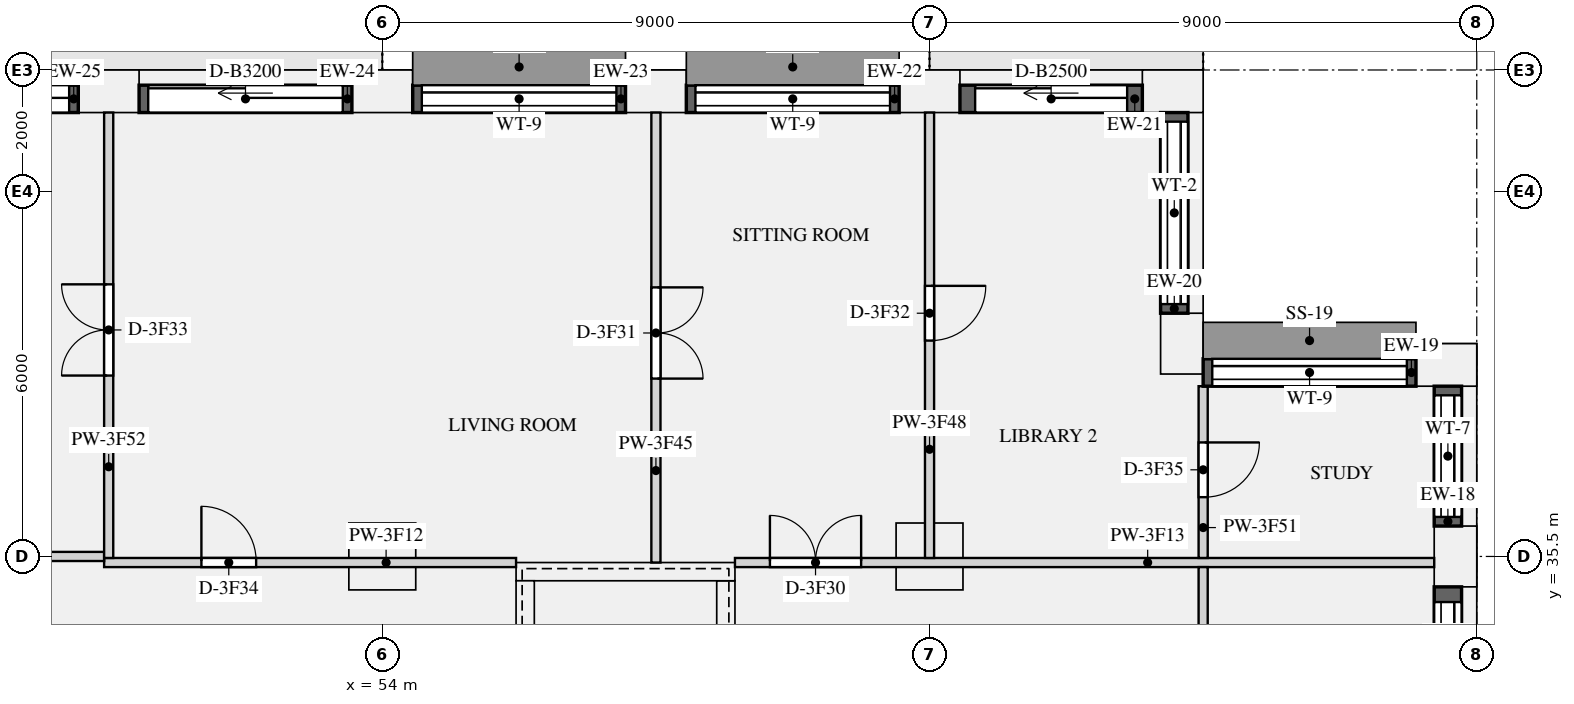
"""IFC4 building model, lengths in metres.
Left out: names, types, materials, properties, quantities, classifications, styles, units other than length and angle.
Written with IfcOpenShell. Run it as: python <this file> out.ifc"""

import sys

from ifc_helpers import new_model, si_unit, direction, frame, frame_2d, origin, origin_2d, place, context, subcontext, project, spatial, rectangle, extrude, element, fill, save


model = new_model("IFC4")
c1 = context("Model", 3, precision=1e-05, world=origin(), true_north=direction((0.0, 1.0)))
c2 = subcontext(c1, "Body", "Model", "MODEL_VIEW")
j1 = project(units=[si_unit("LENGTHUNIT", "METRE"), si_unit("PLANEANGLEUNIT", "RADIAN")], contexts=[c1])
p1 = place(None, origin())
s1 = spatial("IfcSite", under=j1, at=p1, CompositionType="ELEMENT")
p2 = place(p1, origin())
s2 = spatial("IfcBuilding", under=s1, at=p2, CompositionType="ELEMENT")
p3 = place(p2, frame((0.0, 0.0, 182.25)))
s3 = spatial("IfcBuildingStorey", under=s2, at=p3, CompositionType="ELEMENT", Elevation=182.25)
p4 = place(p3, frame((71.65, 35.5, 0.0), z_axis=(0.0, 0.0, 1.0), x_axis=(0.0, 1.0, 0.0)))
e1 = element("IfcColumn", 1, at=p4, inside=s3, PredefinedType="USERDEFINED", context=c2, shape_type="SweptSolid", body=[
    extrude(rectangle(XDim=1.0, YDim=0.7, at=origin_2d()), origin(), (0.0, 0.0, 1.0), 2.65),
])
p5 = place(p3, frame((71.5, 38.65, 0.0), z_axis=(0.0, 0.0, 1.0), x_axis=(-1.0, 0.0, 0.0)))
e2 = element("IfcColumn", 2, at=p5, inside=s3, PredefinedType="USERDEFINED", context=c2, shape_type="SweptSolid", body=[
    extrude(rectangle(XDim=1.0, YDim=0.7, at=origin_2d()), origin(), (0.0, 0.0, 1.0), 3.15),
])
for number, where, z_axis, x_axis in (
    (3, (67.15, 39.0, 0.0), (0.0, 0.0, 1.0), (0.0, 1.0, 0.0)),
    (4, (67.0, 43.15, 0.0), (0.0, 0.0, 1.0), (-1.0, 0.0, 0.0)),
    (5, (63.0, 43.15, 0.0), (0.0, 0.0, 1.0), (-1.0, 0.0, 0.0)),
    (6, (58.5, 43.15, 0.0), (0.0, 0.0, 1.0), (-1.0, 0.0, 0.0)),
    (7, (54.0, 43.15, 0.0), (0.0, 0.0, 1.0), (-1.0, 0.0, 0.0)),
    (8, (49.5, 43.15, 0.0), (0.0, 0.0, 1.0), (-1.0, 0.0, 0.0)),
):
    element("IfcColumn", number, at=place(p3, frame(where, z_axis=z_axis, x_axis=x_axis)), inside=s3, PredefinedType="USERDEFINED", context=c2, shape_type="SweptSolid", body=[
        extrude(rectangle(XDim=1.0, YDim=0.7, at=origin_2d()), origin(), (0.0, 0.0, 1.0), 2.65),
    ])
for number, where, z_axis, x_axis in (
    (9, (54.0, 35.5, 0.0), (0.0, 0.0, 1.0), (1.0, 0.0, 0.0)),
    (10, (63.0, 35.5, 0.0), (0.0, 0.0, 1.0), (1.0, 0.0, 0.0)),
):
    element("IfcColumn", number, at=place(p3, frame(where, z_axis=z_axis, x_axis=x_axis)), inside=s3, PredefinedType="COLUMN", context=c2, shape_type="SweptSolid", body=[
        extrude(rectangle(XDim=1.1, YDim=1.1, at=origin_2d()), origin(), (0.0, 0.0, 1.0), 3.15),
    ])
p6 = place(p3, frame((56.2, 35.25, 0.0), z_axis=(0.0, 0.0, 1.0), x_axis=(1.0, 0.0, 0.0)))
e11 = element("IfcWall", 11, at=p6, inside=s3, PredefinedType="SHEAR", context=c2, shape_type="SweptSolid", body=[
    extrude(rectangle(XDim=3.6, YDim=0.3, at=frame_2d((1.8, 0.0))), origin(), (0.0, 0.0, 1.0), 3.15),
])
for number, where, z_axis, x_axis in (
    (12, (56.35, 27.3, 0.0), (0.0, 0.0, 1.0), (0.0, 1.0, 0.0)),
    (13, (59.65, 27.3, 0.0), (0.0, 0.0, 1.0), (0.0, 1.0, 0.0)),
):
    element("IfcWall", number, at=place(p3, frame(where, z_axis=z_axis, x_axis=x_axis)), inside=s3, PredefinedType="SHEAR", context=c2, shape_type="SweptSolid", body=[
        extrude(rectangle(XDim=7.8, YDim=0.3, at=frame_2d((3.9, 0.0))), origin(), (0.0, 0.0, 1.0), 3.15),
    ])
p7 = place(p3, frame((71.525, 32.5, 0.9), z_axis=(0.0, 0.0, 1.0), x_axis=(0.0, 1.0, 0.0)))
e14 = element("IfcWall", 14, at=p7, inside=s3, PredefinedType="SOLIDWALL", context=c2, shape_type="SweptSolid", body=[
    extrude(rectangle(XDim=2.5, YDim=0.45, at=frame_2d((1.25, 0.0))), origin(), (0.0, 0.0, 1.0), 1.75),
])
p8 = place(p7, frame((0.25, 0.0, 0.15)))
e15 = element("IfcOpeningElement", 15, at=p8, cuts=e14, PredefinedType="OPENING", context=c2, shape_type="SweptSolid", body=[
    extrude(rectangle(XDim=2.0, YDim=1.5, at=frame_2d((1.0, 0.75))), frame((0.0, 0.235, 0.0), z_axis=(0.0, -1.0, 0.0), x_axis=(1.0, 0.0, 0.0)), (0.0, 0.0, 1.0), 0.47),
])
p9 = place(p3, frame((71.525, 36.0, 0.9), z_axis=(0.0, 0.0, 1.0), x_axis=(0.0, 1.0, 0.0)))
e16 = element("IfcWall", 16, at=p9, inside=s3, PredefinedType="SOLIDWALL", context=c2, shape_type="SweptSolid", body=[
    extrude(rectangle(XDim=2.3, YDim=0.45, at=frame_2d((1.15, 0.0))), origin(), (0.0, 0.0, 1.0), 1.75),
])
p10 = place(p9, frame((0.15, 0.0, 0.15)))
e17 = element("IfcOpeningElement", 17, at=p10, cuts=e16, PredefinedType="OPENING", context=c2, shape_type="SweptSolid", body=[
    extrude(rectangle(XDim=2.0, YDim=1.5, at=frame_2d((1.0, 0.75))), frame((0.0, 0.235, 0.0), z_axis=(0.0, -1.0, 0.0), x_axis=(1.0, 0.0, 0.0)), (0.0, 0.0, 1.0), 0.47),
])
p11 = place(p3, frame((71.0, 38.525, 0.9), z_axis=(0.0, 0.0, 1.0), x_axis=(-1.0, 0.0, 0.0)))
e18 = element("IfcWall", 18, at=p11, inside=s3, PredefinedType="SOLIDWALL", context=c2, shape_type="SweptSolid", body=[
    extrude(rectangle(XDim=3.5, YDim=0.45, at=frame_2d((1.75, 0.0))), origin(), (0.0, 0.0, 1.0), 1.75),
])
p12 = place(p11, frame((0.15, 0.0, 0.15)))
e19 = element("IfcOpeningElement", 19, at=p12, cuts=e18, PredefinedType="OPENING", context=c2, shape_type="SweptSolid", body=[
    extrude(rectangle(XDim=3.2, YDim=1.5, at=frame_2d((1.6, 0.75))), frame((0.0, 0.235, 0.0), z_axis=(0.0, -1.0, 0.0), x_axis=(1.0, 0.0, 0.0)), (0.0, 0.0, 1.0), 0.47),
])
p13 = place(p3, frame((67.025, 39.5, 0.9), z_axis=(0.0, 0.0, 1.0), x_axis=(0.0, 1.0, 0.0)))
e20 = element("IfcWall", 20, at=p13, inside=s3, PredefinedType="SOLIDWALL", context=c2, shape_type="SweptSolid", body=[
    extrude(rectangle(XDim=3.3, YDim=0.45, at=frame_2d((1.65, 0.0))), origin(), (0.0, 0.0, 1.0), 1.75),
])
p14 = place(p13, frame((0.15, 0.0, 0.15)))
e21 = element("IfcOpeningElement", 21, at=p14, cuts=e20, PredefinedType="OPENING", context=c2, shape_type="SweptSolid", body=[
    extrude(rectangle(XDim=3.0, YDim=1.5, at=frame_2d((1.5, 0.75))), frame((0.0, 0.235, 0.0), z_axis=(0.0, -1.0, 0.0), x_axis=(1.0, 0.0, 0.0)), (0.0, 0.0, 1.0), 0.47),
])
p15 = place(p3, frame((66.5, 43.025, 0.0), z_axis=(0.0, 0.0, 1.0), x_axis=(-1.0, 0.0, 0.0)))
e22 = element("IfcWall", 22, at=p15, inside=s3, PredefinedType="SOLIDWALL", context=c2, shape_type="SweptSolid", body=[
    extrude(rectangle(XDim=3.0, YDim=0.45, at=frame_2d((1.5, 0.0))), origin(), (0.0, 0.0, 1.0), 2.65),
])
p16 = place(p15, frame((0.25, 0.0, 0.0)))
e23 = element("IfcOpeningElement", 23, at=p16, cuts=e22, PredefinedType="OPENING", context=c2, shape_type="SweptSolid", body=[
    extrude(rectangle(XDim=2.5, YDim=2.3, at=frame_2d((1.25, 1.15))), frame((0.0, 0.235, 0.0), z_axis=(0.0, -1.0, 0.0), x_axis=(1.0, 0.0, 0.0)), (0.0, 0.0, 1.0), 0.47),
])
p17 = place(p3, frame((62.5, 43.025, 0.9), z_axis=(0.0, 0.0, 1.0), x_axis=(-1.0, 0.0, 0.0)))
e24 = element("IfcWall", 24, at=p17, inside=s3, PredefinedType="SOLIDWALL", context=c2, shape_type="SweptSolid", body=[
    extrude(rectangle(XDim=3.5, YDim=0.45, at=frame_2d((1.75, 0.0))), origin(), (0.0, 0.0, 1.0), 1.75),
])
p18 = place(p17, frame((0.15, 0.0, 0.15)))
e25 = element("IfcOpeningElement", 25, at=p18, cuts=e24, PredefinedType="OPENING", context=c2, shape_type="SweptSolid", body=[
    extrude(rectangle(XDim=3.2, YDim=1.5, at=frame_2d((1.6, 0.75))), frame((0.0, 0.235, 0.0), z_axis=(0.0, -1.0, 0.0), x_axis=(1.0, 0.0, 0.0)), (0.0, 0.0, 1.0), 0.47),
])
p19 = place(p3, frame((58.0, 43.025, 0.9), z_axis=(0.0, 0.0, 1.0), x_axis=(-1.0, 0.0, 0.0)))
e26 = element("IfcWall", 26, at=p19, inside=s3, PredefinedType="SOLIDWALL", context=c2, shape_type="SweptSolid", body=[
    extrude(rectangle(XDim=3.5, YDim=0.45, at=frame_2d((1.75, 0.0))), origin(), (0.0, 0.0, 1.0), 1.75),
])
p20 = place(p19, frame((0.15, 0.0, 0.15)))
e27 = element("IfcOpeningElement", 27, at=p20, cuts=e26, PredefinedType="OPENING", context=c2, shape_type="SweptSolid", body=[
    extrude(rectangle(XDim=3.2, YDim=1.5, at=frame_2d((1.6, 0.75))), frame((0.0, 0.235, 0.0), z_axis=(0.0, -1.0, 0.0), x_axis=(1.0, 0.0, 0.0)), (0.0, 0.0, 1.0), 0.47),
])
p21 = place(p3, frame((53.5, 43.025, 0.0), z_axis=(0.0, 0.0, 1.0), x_axis=(-1.0, 0.0, 0.0)))
e28 = element("IfcWall", 28, at=p21, inside=s3, PredefinedType="SOLIDWALL", context=c2, shape_type="SweptSolid", body=[
    extrude(rectangle(XDim=3.5, YDim=0.45, at=frame_2d((1.75, 0.0))), origin(), (0.0, 0.0, 1.0), 2.65),
])
p22 = place(p21, frame((0.15, 0.0, 0.0)))
e29 = element("IfcOpeningElement", 29, at=p22, cuts=e28, PredefinedType="OPENING", context=c2, shape_type="SweptSolid", body=[
    extrude(rectangle(XDim=3.2, YDim=2.3, at=frame_2d((1.6, 1.15))), frame((0.0, 0.235, 0.0), z_axis=(0.0, -1.0, 0.0), x_axis=(1.0, 0.0, 0.0)), (0.0, 0.0, 1.0), 0.47),
])
p23 = place(p3, frame((49.0, 43.025, 0.0), z_axis=(0.0, 0.0, 1.0), x_axis=(-1.0, 0.0, 0.0)))
e30 = element("IfcWall", 30, at=p23, inside=s3, PredefinedType="SOLIDWALL", context=c2, shape_type="SweptSolid", body=[
    extrude(rectangle(XDim=3.5, YDim=0.45, at=frame_2d((1.75, 0.0))), origin(), (0.0, 0.0, 1.0), 2.65),
])
p24 = place(p23, frame((0.15, 0.0, 0.0)))
e31 = element("IfcOpeningElement", 31, at=p24, cuts=e30, PredefinedType="OPENING", context=c2, shape_type="SweptSolid", body=[
    extrude(rectangle(XDim=3.2, YDim=2.3, at=frame_2d((1.6, 1.15))), frame((0.0, 0.235, 0.0), z_axis=(0.0, -1.0, 0.0), x_axis=(1.0, 0.0, 0.0)), (0.0, 0.0, 1.0), 0.47),
])
p25 = place(p3, frame((49.425, 35.4, 0.0), z_axis=(0.0, 0.0, 1.0), x_axis=(1.0, 0.0, 0.0)))
e32 = element("IfcWall", 32, at=p25, inside=s3, PredefinedType="PARTITIONING", context=c2, shape_type="SweptSolid", body=[
    extrude(rectangle(XDim=6.775, YDim=0.15, at=frame_2d((3.387, 0.0))), origin(), (0.0, 0.0, 1.0), 2.65),
])
p26 = place(p25, frame((1.6, 0.0, 0.0)))
e33 = element("IfcOpeningElement", 33, at=p26, cuts=e32, PredefinedType="OPENING", context=c2, shape_type="SweptSolid", body=[
    extrude(rectangle(XDim=0.9, YDim=2.1, at=frame_2d((0.45, 1.05))), frame((0.0, 0.085, 0.0), z_axis=(0.0, -1.0, 0.0), x_axis=(1.0, 0.0, 0.0)), (0.0, 0.0, 1.0), 0.17),
])
p27 = place(p3, frame((59.8, 35.4, 0.0), z_axis=(0.0, 0.0, 1.0), x_axis=(1.0, 0.0, 0.0)))
e34 = element("IfcWall", 34, at=p27, inside=s3, PredefinedType="PARTITIONING", context=c2, shape_type="SweptSolid", body=[
    extrude(rectangle(XDim=11.5, YDim=0.15, at=frame_2d((5.75, 0.0))), origin(), (0.0, 0.0, 1.0), 2.65),
])
p28 = place(p27, frame((0.575, 0.0, 0.0)))
e35 = element("IfcOpeningElement", 35, at=p28, cuts=e34, PredefinedType="OPENING", context=c2, shape_type="SweptSolid", body=[
    extrude(rectangle(XDim=1.5, YDim=2.1, at=frame_2d((0.75, 1.05))), frame((0.0, 0.085, 0.0), z_axis=(0.0, -1.0, 0.0), x_axis=(1.0, 0.0, 0.0)), (0.0, 0.0, 1.0), 0.17),
])
p29 = place(p3, frame((45.0, 35.5, 0.0), z_axis=(0.0, 0.0, 1.0), x_axis=(1.0, 0.0, 0.0)))
e36 = element("IfcWall", 36, at=p29, inside=s3, PredefinedType="PARTITIONING", context=c2, shape_type="SweptSolid", body=[
    extrude(rectangle(XDim=4.425, YDim=0.15, at=frame_2d((2.212, 0.0))), origin(), (0.0, 0.0, 1.0), 2.65),
])
p30 = place(p3, frame((58.5, 35.4, 0.0), z_axis=(0.0, 0.0, 1.0), x_axis=(0.0, 1.0, 0.0)))
e37 = element("IfcWall", 37, at=p30, inside=s3, PredefinedType="PARTITIONING", context=c2, shape_type="SweptSolid", body=[
    extrude(rectangle(XDim=7.4, YDim=0.15, at=frame_2d((3.7, 0.0))), origin(), (0.0, 0.0, 1.0), 2.65),
])
p31 = place(p30, frame((3.025, 0.0, 0.0)))
e38 = element("IfcOpeningElement", 38, at=p31, cuts=e37, PredefinedType="OPENING", context=c2, shape_type="SweptSolid", body=[
    extrude(rectangle(XDim=1.5, YDim=2.1, at=frame_2d((0.75, 1.05))), frame((0.0, 0.085, 0.0), z_axis=(0.0, -1.0, 0.0), x_axis=(1.0, 0.0, 0.0)), (0.0, 0.0, 1.0), 0.17),
])
p32 = place(p3, frame((63.0, 35.475, 0.0), z_axis=(0.0, 0.0, 1.0), x_axis=(0.0, 1.0, 0.0)))
e39 = element("IfcWall", 39, at=p32, inside=s3, PredefinedType="PARTITIONING", context=c2, shape_type="SweptSolid", body=[
    extrude(rectangle(XDim=7.325, YDim=0.15, at=frame_2d((3.663, 0.0))), origin(), (0.0, 0.0, 1.0), 2.65),
])
p33 = place(p32, frame((3.575, 0.0, 0.0)))
e40 = element("IfcOpeningElement", 40, at=p33, cuts=e39, PredefinedType="OPENING", context=c2, shape_type="SweptSolid", body=[
    extrude(rectangle(XDim=0.9, YDim=2.1, at=frame_2d((0.45, 1.05))), frame((0.0, 0.085, 0.0), z_axis=(0.0, -1.0, 0.0), x_axis=(1.0, 0.0, 0.0)), (0.0, 0.0, 1.0), 0.17),
])
p34 = place(p3, frame((67.5, 24.575, 0.0), z_axis=(0.0, 0.0, 1.0), x_axis=(0.0, 1.0, 0.0)))
e41 = element("IfcWall", 41, at=p34, inside=s3, PredefinedType="PARTITIONING", context=c2, shape_type="SweptSolid", body=[
    extrude(rectangle(XDim=10.75, YDim=0.15, at=frame_2d((5.375, 0.0))), origin(), (0.0, 0.0, 1.0), 2.65),
])
p35 = place(p34, frame((6.875, 0.0, 0.0)))
e42 = element("IfcOpeningElement", 42, at=p35, cuts=e41, PredefinedType="OPENING", context=c2, shape_type="SweptSolid", body=[
    extrude(rectangle(XDim=1.5, YDim=2.1, at=frame_2d((0.75, 1.05))), frame((0.0, 0.085, 0.0), z_axis=(0.0, -1.0, 0.0), x_axis=(1.0, 0.0, 0.0)), (0.0, 0.0, 1.0), 0.17),
])
p36 = place(p3, frame((67.5, 35.475, 0.0), z_axis=(0.0, 0.0, 1.0), x_axis=(0.0, 1.0, 0.0)))
e43 = element("IfcWall", 43, at=p36, inside=s3, PredefinedType="PARTITIONING", context=c2, shape_type="SweptSolid", body=[
    extrude(rectangle(XDim=2.825, YDim=0.15, at=frame_2d((1.413, 0.0))), origin(), (0.0, 0.0, 1.0), 2.65),
])
p37 = place(p36, frame((1.0, 0.0, 0.0)))
e44 = element("IfcOpeningElement", 44, at=p37, cuts=e43, PredefinedType="OPENING", context=c2, shape_type="SweptSolid", body=[
    extrude(rectangle(XDim=0.9, YDim=2.1, at=frame_2d((0.45, 1.05))), frame((0.0, 0.085, 0.0), z_axis=(0.0, -1.0, 0.0), x_axis=(1.0, 0.0, 0.0)), (0.0, 0.0, 1.0), 0.17),
])
p38 = place(p3, frame((49.5, 35.475, 0.0), z_axis=(0.0, 0.0, 1.0), x_axis=(0.0, 1.0, 0.0)))
e45 = element("IfcWall", 45, at=p38, inside=s3, PredefinedType="PARTITIONING", context=c2, shape_type="SweptSolid", body=[
    extrude(rectangle(XDim=7.325, YDim=0.15, at=frame_2d((3.663, 0.0))), origin(), (0.0, 0.0, 1.0), 2.65),
])
p39 = place(p38, frame((3.0, 0.0, 0.0)))
e46 = element("IfcOpeningElement", 46, at=p39, cuts=e45, PredefinedType="OPENING", context=c2, shape_type="SweptSolid", body=[
    extrude(rectangle(XDim=1.5, YDim=2.1, at=frame_2d((0.75, 1.05))), frame((0.0, 0.085, 0.0), z_axis=(0.0, -1.0, 0.0), x_axis=(1.0, 0.0, 0.0)), (0.0, 0.0, 1.0), 0.17),
])
p40 = place(p8, origin())
e47 = element("IfcWindow", 47, at=p40, inside=s3, PartitioningType="SINGLE_PANEL", PredefinedType="WINDOW", context=c2, shape_type="SweptSolid", body=[
    extrude(rectangle(XDim=2.0, YDim=1.5, at=frame_2d((1.0, 0.75))), frame((0.0, -0.065, 0.0), z_axis=(0.0, -1.0, 0.0), x_axis=(1.0, 0.0, 0.0)), (0.0, 0.0, 1.0), 0.06),
])
fill(e15, e47)
p41 = place(p10, origin())
e48 = element("IfcWindow", 48, at=p41, inside=s3, PartitioningType="SINGLE_PANEL", PredefinedType="WINDOW", context=c2, shape_type="SweptSolid", body=[
    extrude(rectangle(XDim=2.0, YDim=1.5, at=frame_2d((1.0, 0.75))), frame((0.0, -0.065, 0.0), z_axis=(0.0, -1.0, 0.0), x_axis=(1.0, 0.0, 0.0)), (0.0, 0.0, 1.0), 0.06),
])
fill(e17, e48)
p42 = place(p12, origin())
e49 = element("IfcWindow", 49, at=p42, inside=s3, PartitioningType="SINGLE_PANEL", PredefinedType="WINDOW", context=c2, shape_type="SweptSolid", body=[
    extrude(rectangle(XDim=3.2, YDim=1.5, at=frame_2d((1.6, 0.75))), frame((0.0, -0.065, 0.0), z_axis=(0.0, -1.0, 0.0), x_axis=(1.0, 0.0, 0.0)), (0.0, 0.0, 1.0), 0.06),
])
fill(e19, e49)
p43 = place(p14, origin())
e50 = element("IfcWindow", 50, at=p43, inside=s3, PartitioningType="SINGLE_PANEL", PredefinedType="WINDOW", context=c2, shape_type="SweptSolid", body=[
    extrude(rectangle(XDim=3.0, YDim=1.5, at=frame_2d((1.5, 0.75))), frame((0.0, -0.065, 0.0), z_axis=(0.0, -1.0, 0.0), x_axis=(1.0, 0.0, 0.0)), (0.0, 0.0, 1.0), 0.06),
])
fill(e21, e50)
p44 = place(p16, origin())
e51 = element("IfcDoor", 51, at=p44, inside=s3, OperationType="SLIDING_TO_LEFT", PredefinedType="DOOR", context=c2, shape_type="SweptSolid", body=[
    extrude(rectangle(XDim=2.5, YDim=2.3, at=frame_2d((1.25, 1.15))), frame((0.0, -0.07, 0.0), z_axis=(0.0, -1.0, 0.0), x_axis=(1.0, 0.0, 0.0)), (0.0, 0.0, 1.0), 0.05),
])
fill(e23, e51)
p45 = place(p18, origin())
e52 = element("IfcWindow", 52, at=p45, inside=s3, PartitioningType="SINGLE_PANEL", PredefinedType="WINDOW", context=c2, shape_type="SweptSolid", body=[
    extrude(rectangle(XDim=3.2, YDim=1.5, at=frame_2d((1.6, 0.75))), frame((0.0, -0.065, 0.0), z_axis=(0.0, -1.0, 0.0), x_axis=(1.0, 0.0, 0.0)), (0.0, 0.0, 1.0), 0.06),
])
fill(e25, e52)
p46 = place(p20, origin())
e53 = element("IfcWindow", 53, at=p46, inside=s3, PartitioningType="SINGLE_PANEL", PredefinedType="WINDOW", context=c2, shape_type="SweptSolid", body=[
    extrude(rectangle(XDim=3.2, YDim=1.5, at=frame_2d((1.6, 0.75))), frame((0.0, -0.065, 0.0), z_axis=(0.0, -1.0, 0.0), x_axis=(1.0, 0.0, 0.0)), (0.0, 0.0, 1.0), 0.06),
])
fill(e27, e53)
p47 = place(p22, origin())
e54 = element("IfcDoor", 54, at=p47, inside=s3, OperationType="SLIDING_TO_LEFT", PredefinedType="DOOR", context=c2, shape_type="SweptSolid", body=[
    extrude(rectangle(XDim=3.2, YDim=2.3, at=frame_2d((1.6, 1.15))), frame((0.0, -0.07, 0.0), z_axis=(0.0, -1.0, 0.0), x_axis=(1.0, 0.0, 0.0)), (0.0, 0.0, 1.0), 0.05),
])
fill(e29, e54)
p48 = place(p24, origin())
e55 = element("IfcDoor", 55, at=p48, inside=s3, OperationType="SLIDING_TO_LEFT", PredefinedType="DOOR", context=c2, shape_type="SweptSolid", body=[
    extrude(rectangle(XDim=3.2, YDim=2.3, at=frame_2d((1.6, 1.15))), frame((0.0, -0.07, 0.0), z_axis=(0.0, -1.0, 0.0), x_axis=(1.0, 0.0, 0.0)), (0.0, 0.0, 1.0), 0.05),
])
fill(e31, e55)
p49 = place(p28, origin())
e56 = element("IfcDoor", 56, at=p49, inside=s3, OperationType="DOUBLE_DOOR_SINGLE_SWING", PredefinedType="DOOR", context=c2, shape_type="SweptSolid", body=[
    extrude(rectangle(XDim=1.5, YDim=2.1, at=frame_2d((0.75, 1.05))), frame((0.0, 0.025, 0.0), z_axis=(0.0, -1.0, 0.0), x_axis=(1.0, 0.0, 0.0)), (0.0, 0.0, 1.0), 0.05),
])
fill(e35, e56)
p50 = place(p31, frame((1.5, 0.0, 0.0), z_axis=(0.0, 0.0, 1.0), x_axis=(-1.0, 0.0, 0.0)))
e57 = element("IfcDoor", 57, at=p50, inside=s3, OperationType="DOUBLE_DOOR_SINGLE_SWING", PredefinedType="DOOR", context=c2, shape_type="SweptSolid", body=[
    extrude(rectangle(XDim=1.5, YDim=2.1, at=frame_2d((0.75, 1.05))), frame((0.0, 0.025, 0.0), z_axis=(0.0, -1.0, 0.0), x_axis=(1.0, 0.0, 0.0)), (0.0, 0.0, 1.0), 0.05),
])
fill(e38, e57)
p51 = place(p33, frame((0.9, 0.0, 0.0), z_axis=(0.0, 0.0, 1.0), x_axis=(-1.0, 0.0, 0.0)))
e58 = element("IfcDoor", 58, at=p51, inside=s3, OperationType="SINGLE_SWING_LEFT", PredefinedType="DOOR", context=c2, shape_type="SweptSolid", body=[
    extrude(rectangle(XDim=0.9, YDim=2.1, at=frame_2d((0.45, 1.05))), frame((0.0, 0.025, 0.0), z_axis=(0.0, -1.0, 0.0), x_axis=(1.0, 0.0, 0.0)), (0.0, 0.0, 1.0), 0.05),
])
fill(e40, e58)
p52 = place(p39, origin())
e59 = element("IfcDoor", 59, at=p52, inside=s3, OperationType="DOUBLE_DOOR_SINGLE_SWING", PredefinedType="DOOR", context=c2, shape_type="SweptSolid", body=[
    extrude(rectangle(XDim=1.5, YDim=2.1, at=frame_2d((0.75, 1.05))), frame((0.0, 0.025, 0.0), z_axis=(0.0, -1.0, 0.0), x_axis=(1.0, 0.0, 0.0)), (0.0, 0.0, 1.0), 0.05),
])
fill(e46, e59)
p53 = place(p26, origin())
e60 = element("IfcDoor", 60, at=p53, inside=s3, OperationType="SINGLE_SWING_LEFT", PredefinedType="DOOR", context=c2, shape_type="SweptSolid", body=[
    extrude(rectangle(XDim=0.9, YDim=2.1, at=frame_2d((0.45, 1.05))), frame((0.0, 0.025, 0.0), z_axis=(0.0, -1.0, 0.0), x_axis=(1.0, 0.0, 0.0)), (0.0, 0.0, 1.0), 0.05),
])
fill(e33, e60)
p54 = place(p37, frame((0.9, 0.0, 0.0), z_axis=(0.0, 0.0, 1.0), x_axis=(-1.0, 0.0, 0.0)))
e61 = element("IfcDoor", 61, at=p54, inside=s3, OperationType="SINGLE_SWING_LEFT", PredefinedType="DOOR", context=c2, shape_type="SweptSolid", body=[
    extrude(rectangle(XDim=0.9, YDim=2.1, at=frame_2d((0.45, 1.05))), frame((0.0, 0.025, 0.0), z_axis=(0.0, -1.0, 0.0), x_axis=(1.0, 0.0, 0.0)), (0.0, 0.0, 1.0), 0.05),
])
fill(e44, e61)
save(model, sys.argv[1])
